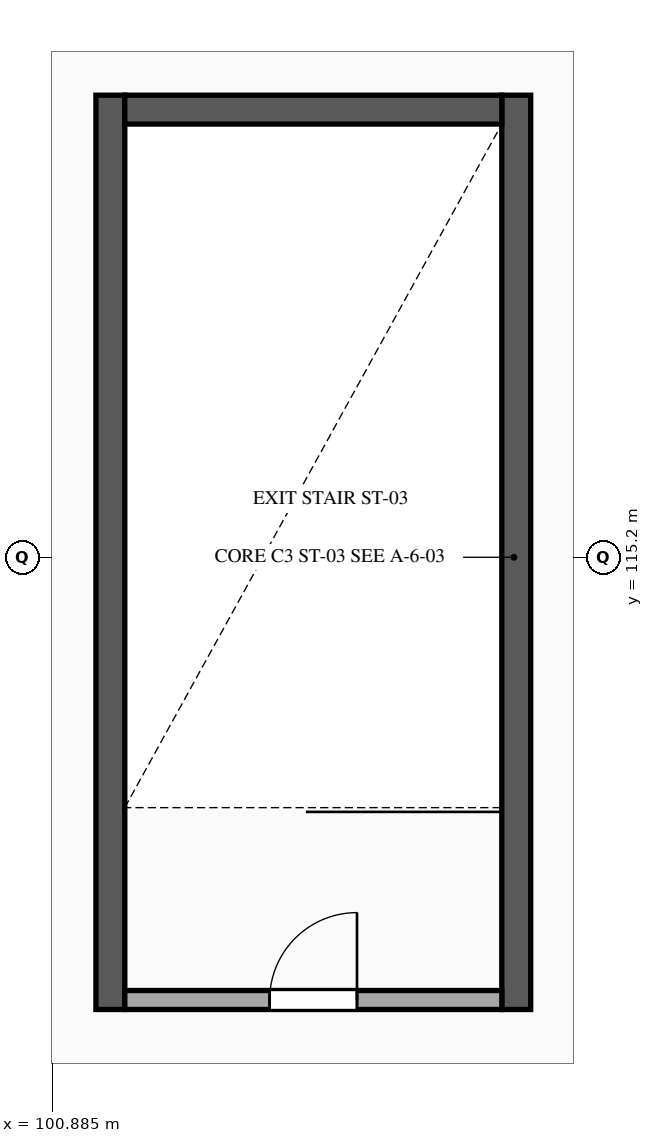
"""IFC4 building model, lengths in metres.
Left out: names, types, materials, properties, quantities, classifications, styles, units other than length and angle.
Written with IfcOpenShell. Run it as: python <this file> out.ifc"""

import sys

from ifc_helpers import new_model, si_unit, direction, frame, frame_2d, origin, place, context, subcontext, project, spatial, rectangle, extrude, element, fill, save


model = new_model("IFC4")
c1 = context("Model", 3, precision=1e-05, world=origin(), true_north=direction((0.0, 1.0)))
c2 = subcontext(c1, "Body", "Model", "MODEL_VIEW")
j1 = project(units=[si_unit("LENGTHUNIT", "METRE"), si_unit("PLANEANGLEUNIT", "RADIAN")], contexts=[c1])
p1 = place(None, origin())
s1 = spatial("IfcSite", under=j1, at=p1, CompositionType="ELEMENT")
p2 = place(p1, origin())
s2 = spatial("IfcBuilding", under=s1, at=p2, CompositionType="ELEMENT")
p3 = place(p2, frame((0.0, 0.0, 19.8)))
s3 = spatial("IfcBuildingStorey", under=s2, at=p3, CompositionType="ELEMENT", Elevation=19.8)
for number, where, z_axis, x_axis in (
    (1, (101.65, 109.25, 0.0), (0.0, 0.0, 1.0), (0.0, 1.0, 0.0)),
    (2, (106.99, 121.28, 0.0), (0.0, 0.0, 1.0), (0.0, -1.0, 0.0)),
):
    element("IfcWall", number, at=place(p3, frame(where, z_axis=z_axis, x_axis=x_axis)), inside=s3, PredefinedType="SHEAR", context=c2, shape_type="SweptSolid", body=[
        extrude(rectangle(XDim=12.03, YDim=0.38, at=frame_2d((6.015, 0.0))), origin(), (0.0, 0.0, 1.0), 4.26),
    ])
p4 = place(p3, frame((101.84, 121.09, 0.0), z_axis=(0.0, 0.0, 1.0), x_axis=(1.0, 0.0, 0.0)))
e3 = element("IfcWall", 3, at=p4, inside=s3, PredefinedType="SHEAR", context=c2, shape_type="SweptSolid", body=[
    extrude(rectangle(XDim=4.96, YDim=0.38, at=frame_2d((2.48, 0.0))), origin(), (0.0, 0.0, 1.0), 4.26),
])
p5 = place(p3, frame((101.84, 109.375, 0.0), z_axis=(0.0, 0.0, 1.0), x_axis=(1.0, 0.0, 0.0)))
e4 = element("IfcWall", 4, at=p5, inside=s3, PredefinedType="STANDARD", context=c2, shape_type="SweptSolid", body=[
    extrude(rectangle(XDim=4.96, YDim=0.25, at=frame_2d((2.48, 0.0))), origin(), (0.0, 0.0, 1.0), 4.25),
])
p6 = place(p5, frame((1.905, 0.0, 0.0)))
e5 = element("IfcOpeningElement", 5, at=p6, cuts=e4, PredefinedType="OPENING", context=c2, shape_type="SweptSolid", body=[
    extrude(rectangle(XDim=1.15, YDim=2.2, at=frame_2d((0.575, 1.1))), frame((0.0, 0.135, 0.0), z_axis=(0.0, -1.0, 0.0), x_axis=(1.0, 0.0, 0.0)), (0.0, 0.0, 1.0), 0.27),
])
p7 = place(p6, origin())
e6 = element("IfcDoor", 6, at=p7, inside=s3, OperationType="SINGLE_SWING_RIGHT", PredefinedType="DOOR", context=c2, shape_type="SweptSolid", body=[
    extrude(rectangle(XDim=1.15, YDim=2.2, at=frame_2d((0.575, 1.1))), frame((0.0, 0.025, 0.0), z_axis=(0.0, -1.0, 0.0), x_axis=(1.0, 0.0, 0.0)), (0.0, 0.0, 1.0), 0.05),
])
fill(e5, e6)
save(model, sys.argv[1])
